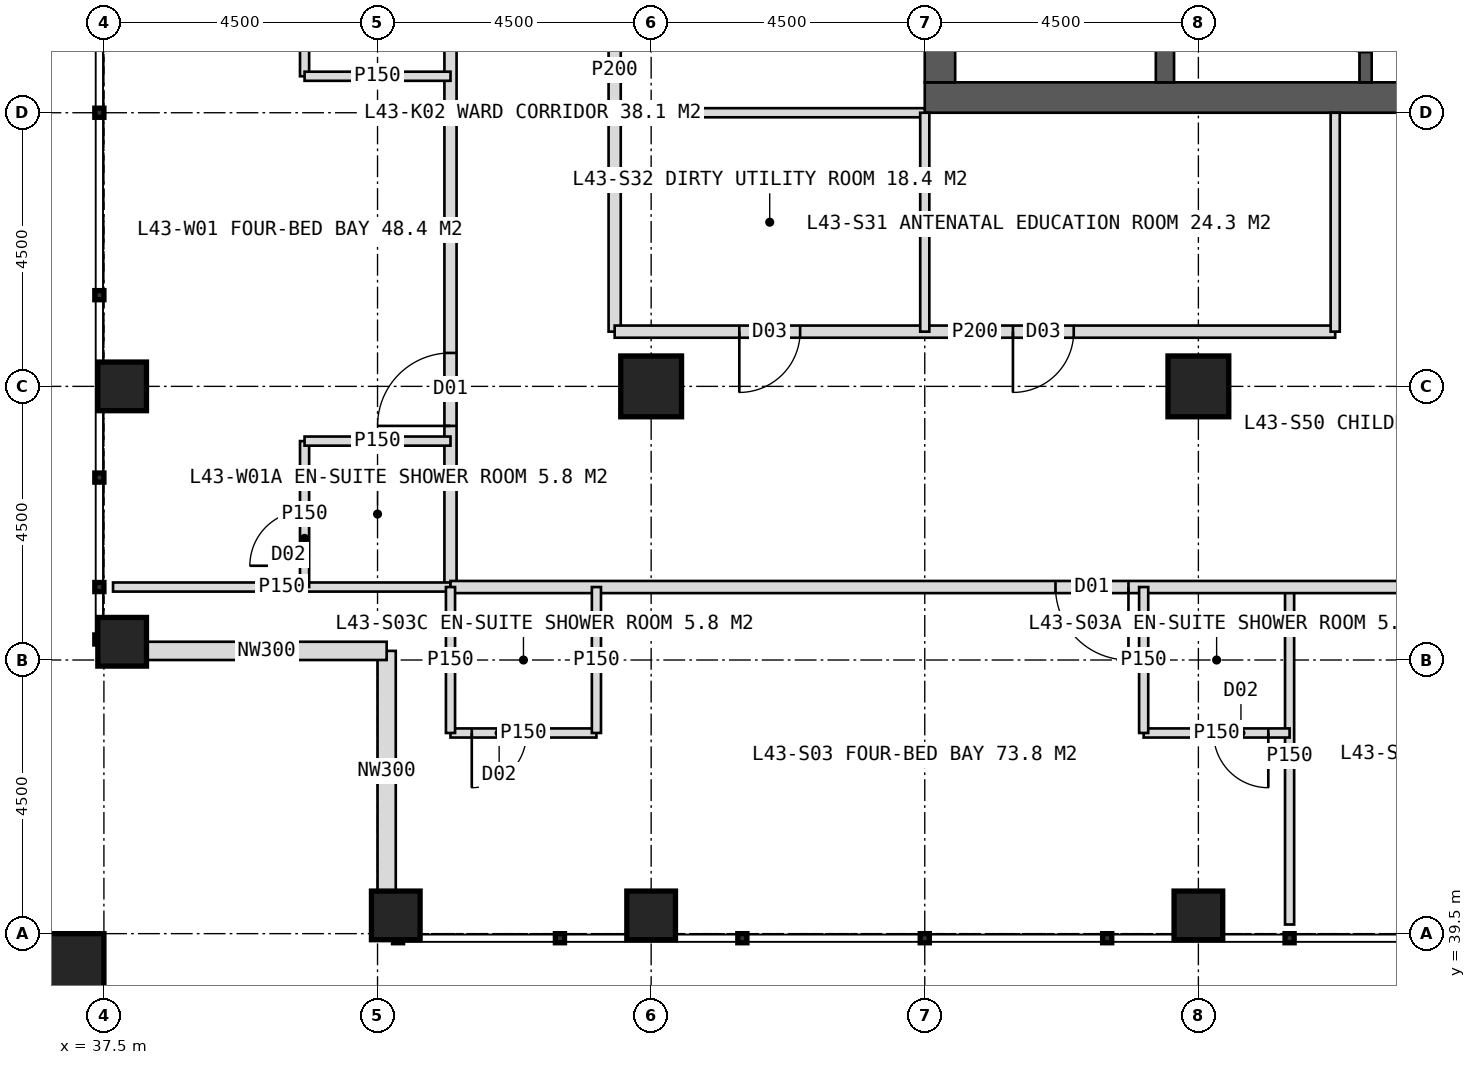
"""IFC4 building model, lengths in metres.
Left out: names, types, materials, properties, quantities, classifications, styles, units other than length and angle.
Written with IfcOpenShell. Run it as: python <this file> out.ifc"""

import sys

from ifc_helpers import new_model, si_unit, direction, frame, frame_2d, origin, origin_2d, place, context, subcontext, project, spatial, rectangle, hollow_rectangle, extrude, element, fill, save


model = new_model("IFC4")
c1 = context("Model", 3, precision=1e-05, world=origin(), true_north=direction((0.0, 1.0)))
c2 = subcontext(c1, "Body", "Model", "MODEL_VIEW")
j1 = project(units=[si_unit("LENGTHUNIT", "METRE"), si_unit("PLANEANGLEUNIT", "RADIAN")], contexts=[c1])
p1 = place(None, origin())
s1 = spatial("IfcSite", under=j1, at=p1, CompositionType="ELEMENT")
p2 = place(p1, origin())
s2 = spatial("IfcBuilding", under=s1, at=p2, CompositionType="ELEMENT")
p3 = place(p2, frame((0.0, 0.0, 181.0)))
s3 = spatial("IfcBuildingStorey", under=s2, at=p3, CompositionType="ELEMENT", Elevation=181.0)
p4 = place(p3, frame((51.0, 53.25, 0.0), z_axis=(0.0, 0.0, 1.0), x_axis=(1.0, 0.0, 0.0)))
e1 = element("IfcWall", 1, at=p4, inside=s3, PredefinedType="SHEAR", context=c2, shape_type="SweptSolid", body=[
    extrude(rectangle(XDim=18.0, YDim=0.5, at=frame_2d((9.0, 0.0))), origin(), (0.0, 0.0, 1.0), 4.0),
])
p5 = place(p4, frame((8.1, 0.0, 0.0)))
e2 = element("IfcOpeningElement", 2, at=p5, cuts=e1, PredefinedType="OPENING", context=c2, shape_type="SweptSolid", body=[
    extrude(rectangle(XDim=1.8, YDim=2.2, at=frame_2d((0.9, 1.1))), frame((0.0, 0.26, 0.0), z_axis=(0.0, -1.0, 0.0), x_axis=(1.0, 0.0, 0.0)), (0.0, 0.0, 1.0), 0.52),
])
p6 = place(p3, frame((51.25, 53.5, 0.0), z_axis=(0.0, 0.0, 1.0), x_axis=(0.0, 1.0, 0.0)))
e3 = element("IfcWall", 3, at=p6, inside=s3, PredefinedType="SHEAR", context=c2, shape_type="SweptSolid", body=[
    extrude(rectangle(XDim=17.0, YDim=0.5, at=frame_2d((8.5, 0.0))), origin(), (0.0, 0.0, 1.0), 4.0),
])
p7 = place(p6, frame((6.1, 0.0, 0.0)))
e4 = element("IfcOpeningElement", 4, at=p7, cuts=e3, PredefinedType="OPENING", context=c2, shape_type="SweptSolid", body=[
    extrude(rectangle(XDim=1.5, YDim=2.2, at=frame_2d((0.75, 1.1))), frame((0.0, 0.26, 0.0), z_axis=(0.0, -1.0, 0.0), x_axis=(1.0, 0.0, 0.0)), (0.0, 0.0, 1.0), 0.52),
])
p8 = place(p3, frame((54.95, 53.5, 0.0), z_axis=(0.0, 0.0, 1.0), x_axis=(0.0, 1.0, 0.0)))
e5 = element("IfcWall", 5, at=p8, inside=s3, PredefinedType="SHEAR", context=c2, shape_type="SweptSolid", body=[
    extrude(rectangle(XDim=17.0, YDim=0.3, at=frame_2d((8.5, 0.0))), origin(), (0.0, 0.0, 1.0), 4.0),
])
p9 = place(p3, frame((58.25, 53.5, 0.0), z_axis=(0.0, 0.0, 1.0), x_axis=(0.0, 1.0, 0.0)))
e6 = element("IfcWall", 6, at=p9, inside=s3, PredefinedType="SHEAR", context=c2, shape_type="SweptSolid", body=[
    extrude(rectangle(XDim=17.0, YDim=0.2, at=frame_2d((8.5, 0.0))), origin(), (0.0, 0.0, 1.0), 4.0),
])
p10 = place(p9, frame((0.496, 0.0, 0.0)))
e7 = element("IfcOpeningElement", 7, at=p10, cuts=e6, PredefinedType="OPENING", context=c2, shape_type="SweptSolid", body=[
    extrude(rectangle(XDim=1.0, YDim=2.1, at=frame_2d((0.5, 1.05))), frame((0.0, 0.11, 0.0), z_axis=(0.0, -1.0, 0.0), x_axis=(1.0, 0.0, 0.0)), (0.0, 0.0, 1.0), 0.22),
])
p11 = place(p9, frame((2.646, 0.0, 0.0)))
e8 = element("IfcOpeningElement", 8, at=p11, cuts=e6, PredefinedType="OPENING", context=c2, shape_type="SweptSolid", body=[
    extrude(rectangle(XDim=1.0, YDim=2.1, at=frame_2d((0.5, 1.05))), frame((0.0, 0.11, 0.0), z_axis=(0.0, -1.0, 0.0), x_axis=(1.0, 0.0, 0.0)), (0.0, 0.0, 1.0), 0.22),
])
p12 = place(p9, frame((5.027, 0.0, 0.0)))
e9 = element("IfcOpeningElement", 9, at=p12, cuts=e6, PredefinedType="OPENING", context=c2, shape_type="SweptSolid", body=[
    extrude(rectangle(XDim=1.0, YDim=2.1, at=frame_2d((0.5, 1.05))), frame((0.0, 0.11, 0.0), z_axis=(0.0, -1.0, 0.0), x_axis=(1.0, 0.0, 0.0)), (0.0, 0.0, 1.0), 0.22),
])
p13 = place(p9, frame((7.126, 0.0, 0.0)))
e10 = element("IfcOpeningElement", 10, at=p13, cuts=e6, PredefinedType="OPENING", context=c2, shape_type="SweptSolid", body=[
    extrude(rectangle(XDim=1.0, YDim=2.1, at=frame_2d((0.5, 1.05))), frame((0.0, 0.11, 0.0), z_axis=(0.0, -1.0, 0.0), x_axis=(1.0, 0.0, 0.0)), (0.0, 0.0, 1.0), 0.22),
])
p14 = place(p9, frame((10.025, 0.0, 0.0)))
e11 = element("IfcOpeningElement", 11, at=p14, cuts=e6, PredefinedType="OPENING", context=c2, shape_type="SweptSolid", body=[
    extrude(rectangle(XDim=1.4, YDim=2.2, at=frame_2d((0.7, 1.1))), frame((0.0, 0.11, 0.0), z_axis=(0.0, -1.0, 0.0), x_axis=(1.0, 0.0, 0.0)), (0.0, 0.0, 1.0), 0.22),
])
p15 = place(p9, frame((14.325, 0.0, 0.0)))
e12 = element("IfcOpeningElement", 12, at=p15, cuts=e6, PredefinedType="OPENING", context=c2, shape_type="SweptSolid", body=[
    extrude(rectangle(XDim=1.4, YDim=2.2, at=frame_2d((0.7, 1.1))), frame((0.0, 0.11, 0.0), z_axis=(0.0, -1.0, 0.0), x_axis=(1.0, 0.0, 0.0)), (0.0, 0.0, 1.0), 0.22),
])
for number, where, z_axis, x_axis in (
    (13, (46.5, 48.5, 0.0), (0.0, 0.0, 1.0), (1.0, 0.0, 0.0)),
    (14, (55.5, 48.5, 0.0), (0.0, 0.0, 1.0), (1.0, 0.0, 0.0)),
):
    element("IfcColumn", number, at=place(p3, frame(where, z_axis=z_axis, x_axis=x_axis)), inside=s3, PredefinedType="COLUMN", context=c2, shape_type="SweptSolid", body=[
        extrude(hollow_rectangle(XDim=1.0, YDim=1.0, WallThickness=0.1, at=origin_2d()), origin(), (0.0, 0.0, 1.0), 4.0),
    ])
for number, where, z_axis, x_axis in (
    (15, (42.3, 39.8, 0.0), (0.0, 0.0, 1.0), (1.0, 0.0, 0.0)),
    (16, (37.8, 44.3, 0.0), (0.0, 0.0, 1.0), (1.0, 0.0, 0.0)),
    (17, (46.5, 39.8, 0.0), (0.0, 0.0, 1.0), (1.0, 0.0, 0.0)),
    (18, (37.8, 48.5, 0.0), (0.0, 0.0, 1.0), (1.0, 0.0, 0.0)),
    (19, (55.5, 39.8, 0.0), (0.0, 0.0, 1.0), (1.0, 0.0, 0.0)),
):
    element("IfcColumn", number, at=place(p3, frame(where, z_axis=z_axis, x_axis=x_axis)), inside=s3, PredefinedType="COLUMN", context=c2, shape_type="SweptSolid", body=[
        extrude(hollow_rectangle(XDim=0.8, YDim=0.8, WallThickness=0.08, at=origin_2d()), origin(), (0.0, 0.0, 1.0), 4.0),
    ])
p16 = place(p3, frame((36.9, 38.9, 0.0), z_axis=(0.0, 0.0, 1.0), x_axis=(1.0, 0.0, 0.0)))
e20 = element("IfcColumn", 20, at=p16, inside=s3, PredefinedType="COLUMN", context=c2, shape_type="SweptSolid", body=[
    extrude(hollow_rectangle(XDim=1.2, YDim=1.2, WallThickness=0.07, at=origin_2d()), origin(), (0.0, 0.0, 1.0), 4.0),
])
for number, where, z_axis, x_axis in (
    (21, (42.15, 40.2, 0.0), (0.0, 0.0, 1.0), (0.0, 1.0, 0.0)),
    (22, (42.15, 44.15, 0.0), (0.0, 0.0, 1.0), (-1.0, 0.0, 0.0)),
):
    element("IfcWall", number, at=place(p3, frame(where, z_axis=z_axis, x_axis=x_axis)), inside=s3, PredefinedType="ELEMENTEDWALL", context=c2, shape_type="SweptSolid", body=[
        extrude(rectangle(XDim=3.95, YDim=0.3, at=frame_2d((1.975, 0.0))), origin(), (0.0, 0.0, 1.0), 2.85),
    ])
p17 = place(p3, frame((43.2, 45.2, 0.0), z_axis=(0.0, 0.0, 1.0), x_axis=(0.0, 1.0, 0.0)))
e23 = element("IfcWall", 23, at=p17, inside=s3, PredefinedType="PARTITIONING", context=c2, shape_type="SweptSolid", body=[
    extrude(rectangle(XDim=33.6, YDim=0.2, at=frame_2d((16.8, 0.0))), origin(), (0.0, 0.0, 1.0), 3.75),
])
p18 = place(p17, frame((2.65, 0.0, 0.0)))
e24 = element("IfcOpeningElement", 24, at=p18, cuts=e23, PredefinedType="OPENING", context=c2, shape_type="SweptSolid", body=[
    extrude(rectangle(XDim=1.2, YDim=2.2, at=frame_2d((0.6, 1.1))), frame((0.0, 0.11, 0.0), z_axis=(0.0, -1.0, 0.0), x_axis=(1.0, 0.0, 0.0)), (0.0, 0.0, 1.0), 0.22),
])
p19 = place(p17, frame((13.45, 0.0, 0.0)))
e25 = element("IfcOpeningElement", 25, at=p19, cuts=e23, PredefinedType="OPENING", context=c2, shape_type="SweptSolid", body=[
    extrude(rectangle(XDim=1.2, YDim=2.2, at=frame_2d((0.6, 1.1))), frame((0.0, 0.11, 0.0), z_axis=(0.0, -1.0, 0.0), x_axis=(1.0, 0.0, 0.0)), (0.0, 0.0, 1.0), 0.22),
])
p20 = place(p17, frame((20.05, 0.0, 0.0)))
e26 = element("IfcOpeningElement", 26, at=p20, cuts=e23, PredefinedType="OPENING", context=c2, shape_type="SweptSolid", body=[
    extrude(rectangle(XDim=1.2, YDim=2.2, at=frame_2d((0.6, 1.1))), frame((0.0, 0.11, 0.0), z_axis=(0.0, -1.0, 0.0), x_axis=(1.0, 0.0, 0.0)), (0.0, 0.0, 1.0), 0.22),
])
p21 = place(p17, frame((29.05, 0.0, 0.0)))
e27 = element("IfcOpeningElement", 27, at=p21, cuts=e23, PredefinedType="OPENING", context=c2, shape_type="SweptSolid", body=[
    extrude(rectangle(XDim=1.2, YDim=2.2, at=frame_2d((0.6, 1.1))), frame((0.0, 0.11, 0.0), z_axis=(0.0, -1.0, 0.0), x_axis=(1.0, 0.0, 0.0)), (0.0, 0.0, 1.0), 0.22),
])
p22 = place(p3, frame((43.2, 45.2, 0.0), z_axis=(0.0, 0.0, 1.0), x_axis=(-1.0, 0.0, 0.0)))
e28 = element("IfcWall", 28, at=p22, inside=s3, PredefinedType="PARTITIONING", context=c2, shape_type="SweptSolid", body=[
    extrude(rectangle(XDim=5.55, YDim=0.15, at=frame_2d((2.775, 0.0))), origin(), (0.0, 0.0, 1.0), 3.75),
])
p23 = place(p3, frame((40.8, 45.2, 0.0), z_axis=(0.0, 0.0, 1.0), x_axis=(0.0, 1.0, 0.0)))
e29 = element("IfcWall", 29, at=p23, inside=s3, PredefinedType="PARTITIONING", context=c2, shape_type="SweptSolid", body=[
    extrude(rectangle(XDim=2.4, YDim=0.15, at=frame_2d((1.2, 0.0))), origin(), (0.0, 0.0, 1.0), 3.75),
])
p24 = place(p23, frame((0.35, 0.0, 0.0)))
e30 = element("IfcOpeningElement", 30, at=p24, cuts=e29, PredefinedType="OPENING", context=c2, shape_type="SweptSolid", body=[
    extrude(rectangle(XDim=0.9, YDim=2.1, at=frame_2d((0.45, 1.05))), frame((0.0, 0.085, 0.0), z_axis=(0.0, -1.0, 0.0), x_axis=(1.0, 0.0, 0.0)), (0.0, 0.0, 1.0), 0.17),
])
p25 = place(p3, frame((43.2, 47.6, 0.0), z_axis=(0.0, 0.0, 1.0), x_axis=(-1.0, 0.0, 0.0)))
e31 = element("IfcWall", 31, at=p25, inside=s3, PredefinedType="PARTITIONING", context=c2, shape_type="SweptSolid", body=[
    extrude(rectangle(XDim=2.4, YDim=0.15, at=frame_2d((1.2, 0.0))), origin(), (0.0, 0.0, 1.0), 3.75),
])
p26 = place(p3, frame((40.8, 53.6, 0.0), z_axis=(0.0, 0.0, 1.0), x_axis=(0.0, 1.0, 0.0)))
e32 = element("IfcWall", 32, at=p26, inside=s3, PredefinedType="PARTITIONING", context=c2, shape_type="SweptSolid", body=[
    extrude(rectangle(XDim=2.4, YDim=0.15, at=frame_2d((1.2, 0.0))), origin(), (0.0, 0.0, 1.0), 3.75),
])
p27 = place(p26, frame((1.15, 0.0, 0.0)))
e33 = element("IfcOpeningElement", 33, at=p27, cuts=e32, PredefinedType="OPENING", context=c2, shape_type="SweptSolid", body=[
    extrude(rectangle(XDim=0.9, YDim=2.1, at=frame_2d((0.45, 1.05))), frame((0.0, 0.085, 0.0), z_axis=(0.0, -1.0, 0.0), x_axis=(1.0, 0.0, 0.0)), (0.0, 0.0, 1.0), 0.17),
])
p28 = place(p3, frame((43.2, 53.6, 0.0), z_axis=(0.0, 0.0, 1.0), x_axis=(-1.0, 0.0, 0.0)))
e34 = element("IfcWall", 34, at=p28, inside=s3, PredefinedType="PARTITIONING", context=c2, shape_type="SweptSolid", body=[
    extrude(rectangle(XDim=2.4, YDim=0.15, at=frame_2d((1.2, 0.0))), origin(), (0.0, 0.0, 1.0), 3.75),
])
p29 = place(p3, frame((51.0, 53.0, 0.0), z_axis=(0.0, 0.0, 1.0), x_axis=(-1.0, 0.0, 0.0)))
e35 = element("IfcWall", 35, at=p29, inside=s3, PredefinedType="PARTITIONING", context=c2, shape_type="SweptSolid", body=[
    extrude(rectangle(XDim=5.1, YDim=0.15, at=frame_2d((2.55, 0.0))), origin(), (0.0, 0.0, 1.0), 3.75),
])
p30 = place(p3, frame((45.9, 49.4, 0.0), z_axis=(0.0, 0.0, 1.0), x_axis=(0.0, 1.0, 0.0)))
e36 = element("IfcWall", 36, at=p30, inside=s3, PredefinedType="PARTITIONING", context=c2, shape_type="SweptSolid", body=[
    extrude(rectangle(XDim=8.6, YDim=0.2, at=frame_2d((4.3, 0.0))), origin(), (0.0, 0.0, 1.0), 3.75),
])
p31 = place(p30, frame((5.6, 0.0, 0.0)))
e37 = element("IfcOpeningElement", 37, at=p31, cuts=e36, PredefinedType="OPENING", context=c2, shape_type="SweptSolid", body=[
    extrude(rectangle(XDim=1.0, YDim=2.1, at=frame_2d((0.5, 1.05))), frame((0.0, 0.11, 0.0), z_axis=(0.0, -1.0, 0.0), x_axis=(1.0, 0.0, 0.0)), (0.0, 0.0, 1.0), 0.22),
])
p32 = place(p3, frame((57.0, 45.2, 0.0), z_axis=(0.0, 0.0, 1.0), x_axis=(0.0, -1.0, 0.0)))
e38 = element("IfcWall", 38, at=p32, inside=s3, PredefinedType="PARTITIONING", context=c2, shape_type="SweptSolid", body=[
    extrude(rectangle(XDim=5.55, YDim=0.15, at=frame_2d((2.775, 0.0))), origin(), (0.0, 0.0, 1.0), 3.75),
])
p33 = place(p3, frame((76.8, 45.2, 0.0), z_axis=(0.0, 0.0, 1.0), x_axis=(-1.0, 0.0, 0.0)))
e39 = element("IfcWall", 39, at=p33, inside=s3, PredefinedType="PARTITIONING", context=c2, shape_type="SweptSolid", body=[
    extrude(rectangle(XDim=33.6, YDim=0.2, at=frame_2d((16.8, 0.0))), origin(), (0.0, 0.0, 1.0), 3.75),
])
p34 = place(p33, frame((2.65, 0.0, 0.0)))
e40 = element("IfcOpeningElement", 40, at=p34, cuts=e39, PredefinedType="OPENING", context=c2, shape_type="SweptSolid", body=[
    extrude(rectangle(XDim=1.2, YDim=2.2, at=frame_2d((0.6, 1.1))), frame((0.0, 0.11, 0.0), z_axis=(0.0, -1.0, 0.0), x_axis=(1.0, 0.0, 0.0)), (0.0, 0.0, 1.0), 0.22),
])
p35 = place(p33, frame((14.05, 0.0, 0.0)))
e41 = element("IfcOpeningElement", 41, at=p35, cuts=e39, PredefinedType="OPENING", context=c2, shape_type="SweptSolid", body=[
    extrude(rectangle(XDim=1.2, YDim=2.2, at=frame_2d((0.6, 1.1))), frame((0.0, 0.11, 0.0), z_axis=(0.0, -1.0, 0.0), x_axis=(1.0, 0.0, 0.0)), (0.0, 0.0, 1.0), 0.22),
])
p36 = place(p33, frame((22.45, 0.0, 0.0)))
e42 = element("IfcOpeningElement", 42, at=p36, cuts=e39, PredefinedType="OPENING", context=c2, shape_type="SweptSolid", body=[
    extrude(rectangle(XDim=1.2, YDim=2.2, at=frame_2d((0.6, 1.1))), frame((0.0, 0.11, 0.0), z_axis=(0.0, -1.0, 0.0), x_axis=(1.0, 0.0, 0.0)), (0.0, 0.0, 1.0), 0.22),
])
p37 = place(p3, frame((57.0, 42.8, 0.0), z_axis=(0.0, 0.0, 1.0), x_axis=(-1.0, 0.0, 0.0)))
e43 = element("IfcWall", 43, at=p37, inside=s3, PredefinedType="PARTITIONING", context=c2, shape_type="SweptSolid", body=[
    extrude(rectangle(XDim=2.4, YDim=0.15, at=frame_2d((1.2, 0.0))), origin(), (0.0, 0.0, 1.0), 3.75),
])
p38 = place(p37, frame((0.35, 0.0, 0.0)))
e44 = element("IfcOpeningElement", 44, at=p38, cuts=e43, PredefinedType="OPENING", context=c2, shape_type="SweptSolid", body=[
    extrude(rectangle(XDim=0.9, YDim=2.1, at=frame_2d((0.45, 1.05))), frame((0.0, 0.085, 0.0), z_axis=(0.0, -1.0, 0.0), x_axis=(1.0, 0.0, 0.0)), (0.0, 0.0, 1.0), 0.17),
])
p39 = place(p3, frame((54.6, 45.2, 0.0), z_axis=(0.0, 0.0, 1.0), x_axis=(0.0, -1.0, 0.0)))
e45 = element("IfcWall", 45, at=p39, inside=s3, PredefinedType="PARTITIONING", context=c2, shape_type="SweptSolid", body=[
    extrude(rectangle(XDim=2.4, YDim=0.15, at=frame_2d((1.2, 0.0))), origin(), (0.0, 0.0, 1.0), 3.75),
])
p40 = place(p3, frame((45.6, 42.8, 0.0), z_axis=(0.0, 0.0, 1.0), x_axis=(-1.0, 0.0, 0.0)))
e46 = element("IfcWall", 46, at=p40, inside=s3, PredefinedType="PARTITIONING", context=c2, shape_type="SweptSolid", body=[
    extrude(rectangle(XDim=2.4, YDim=0.15, at=frame_2d((1.2, 0.0))), origin(), (0.0, 0.0, 1.0), 3.75),
])
p41 = place(p40, frame((1.15, 0.0, 0.0)))
e47 = element("IfcOpeningElement", 47, at=p41, cuts=e46, PredefinedType="OPENING", context=c2, shape_type="SweptSolid", body=[
    extrude(rectangle(XDim=0.9, YDim=2.1, at=frame_2d((0.45, 1.05))), frame((0.0, 0.085, 0.0), z_axis=(0.0, -1.0, 0.0), x_axis=(1.0, 0.0, 0.0)), (0.0, 0.0, 1.0), 0.17),
])
for number, where, z_axis, x_axis in (
    (48, (45.6, 45.2, 0.0), (0.0, 0.0, 1.0), (0.0, -1.0, 0.0)),
    (49, (43.2, 45.2, 0.0), (0.0, 0.0, 1.0), (0.0, -1.0, 0.0)),
):
    element("IfcWall", number, at=place(p3, frame(where, z_axis=z_axis, x_axis=x_axis)), inside=s3, PredefinedType="PARTITIONING", context=c2, shape_type="SweptSolid", body=[
        extrude(rectangle(XDim=2.4, YDim=0.15, at=frame_2d((1.2, 0.0))), origin(), (0.0, 0.0, 1.0), 3.75),
    ])
p42 = place(p3, frame((57.75, 49.4, 0.0), z_axis=(0.0, 0.0, 1.0), x_axis=(-1.0, 0.0, 0.0)))
e50 = element("IfcWall", 50, at=p42, inside=s3, PredefinedType="PARTITIONING", context=c2, shape_type="SweptSolid", body=[
    extrude(rectangle(XDim=11.85, YDim=0.2, at=frame_2d((5.925, 0.0))), origin(), (0.0, 0.0, 1.0), 3.75),
])
p43 = place(p42, frame((4.3, 0.0, 0.0)))
e51 = element("IfcOpeningElement", 51, at=p43, cuts=e50, PredefinedType="OPENING", context=c2, shape_type="SweptSolid", body=[
    extrude(rectangle(XDim=1.0, YDim=2.1, at=frame_2d((0.5, 1.05))), frame((0.0, 0.11, 0.0), z_axis=(0.0, -1.0, 0.0), x_axis=(1.0, 0.0, 0.0)), (0.0, 0.0, 1.0), 0.22),
])
p44 = place(p42, frame((8.8, 0.0, 0.0)))
e52 = element("IfcOpeningElement", 52, at=p44, cuts=e50, PredefinedType="OPENING", context=c2, shape_type="SweptSolid", body=[
    extrude(rectangle(XDim=1.0, YDim=2.1, at=frame_2d((0.5, 1.05))), frame((0.0, 0.11, 0.0), z_axis=(0.0, -1.0, 0.0), x_axis=(1.0, 0.0, 0.0)), (0.0, 0.0, 1.0), 0.22),
])
for number, where, z_axis, x_axis in (
    (53, (57.75, 53.0, 0.0), (0.0, 0.0, 1.0), (0.0, -1.0, 0.0)),
    (54, (51.0, 53.0, 0.0), (0.0, 0.0, 1.0), (0.0, -1.0, 0.0)),
):
    element("IfcWall", number, at=place(p3, frame(where, z_axis=z_axis, x_axis=x_axis)), inside=s3, PredefinedType="PARTITIONING", context=c2, shape_type="SweptSolid", body=[
        extrude(rectangle(XDim=3.6, YDim=0.15, at=frame_2d((1.8, 0.0))), origin(), (0.0, 0.0, 1.0), 3.75),
    ])
p45 = place(p18, origin())
e55 = element("IfcDoor", 55, at=p45, inside=s3, OperationType="SINGLE_SWING_LEFT", PredefinedType="DOOR", context=c2, shape_type="SweptSolid", body=[
    extrude(rectangle(XDim=1.2, YDim=2.2, at=frame_2d((0.6, 1.1))), frame((0.0, 0.025, 0.0), z_axis=(0.0, -1.0, 0.0), x_axis=(1.0, 0.0, 0.0)), (0.0, 0.0, 1.0), 0.05),
])
fill(e24, e55)
p46 = place(p24, origin())
e56 = element("IfcDoor", 56, at=p46, inside=s3, OperationType="SINGLE_SWING_LEFT", PredefinedType="DOOR", context=c2, shape_type="SweptSolid", body=[
    extrude(rectangle(XDim=0.9, YDim=2.1, at=frame_2d((0.45, 1.05))), frame((0.0, 0.025, 0.0), z_axis=(0.0, -1.0, 0.0), x_axis=(1.0, 0.0, 0.0)), (0.0, 0.0, 1.0), 0.05),
])
fill(e30, e56)
p47 = place(p36, origin())
e57 = element("IfcDoor", 57, at=p47, inside=s3, OperationType="SINGLE_SWING_LEFT", PredefinedType="DOOR", context=c2, shape_type="SweptSolid", body=[
    extrude(rectangle(XDim=1.2, YDim=2.2, at=frame_2d((0.6, 1.1))), frame((0.0, 0.025, 0.0), z_axis=(0.0, -1.0, 0.0), x_axis=(1.0, 0.0, 0.0)), (0.0, 0.0, 1.0), 0.05),
])
fill(e42, e57)
p48 = place(p38, origin())
e58 = element("IfcDoor", 58, at=p48, inside=s3, OperationType="SINGLE_SWING_LEFT", PredefinedType="DOOR", context=c2, shape_type="SweptSolid", body=[
    extrude(rectangle(XDim=0.9, YDim=2.1, at=frame_2d((0.45, 1.05))), frame((0.0, 0.025, 0.0), z_axis=(0.0, -1.0, 0.0), x_axis=(1.0, 0.0, 0.0)), (0.0, 0.0, 1.0), 0.05),
])
fill(e44, e58)
p49 = place(p41, origin())
e59 = element("IfcDoor", 59, at=p49, inside=s3, OperationType="SINGLE_SWING_RIGHT", PredefinedType="DOOR", context=c2, shape_type="SweptSolid", body=[
    extrude(rectangle(XDim=0.9, YDim=2.1, at=frame_2d((0.45, 1.05))), frame((0.0, 0.025, 0.0), z_axis=(0.0, -1.0, 0.0), x_axis=(1.0, 0.0, 0.0)), (0.0, 0.0, 1.0), 0.05),
])
fill(e47, e59)
p50 = place(p43, origin())
e60 = element("IfcDoor", 60, at=p50, inside=s3, OperationType="SINGLE_SWING_RIGHT", PredefinedType="DOOR", context=c2, shape_type="SweptSolid", body=[
    extrude(rectangle(XDim=1.0, YDim=2.1, at=frame_2d((0.5, 1.05))), frame((0.0, 0.025, 0.0), z_axis=(0.0, -1.0, 0.0), x_axis=(1.0, 0.0, 0.0)), (0.0, 0.0, 1.0), 0.05),
])
fill(e51, e60)
p51 = place(p44, origin())
e61 = element("IfcDoor", 61, at=p51, inside=s3, OperationType="SINGLE_SWING_RIGHT", PredefinedType="DOOR", context=c2, shape_type="SweptSolid", body=[
    extrude(rectangle(XDim=1.0, YDim=2.1, at=frame_2d((0.5, 1.05))), frame((0.0, 0.025, 0.0), z_axis=(0.0, -1.0, 0.0), x_axis=(1.0, 0.0, 0.0)), (0.0, 0.0, 1.0), 0.05),
])
fill(e52, e61)
p52 = place(p10, origin())
e62 = element("IfcDoor", 62, at=p52, inside=s3, OperationType="SINGLE_SWING_RIGHT", PredefinedType="DOOR", context=c2, shape_type="SweptSolid", body=[
    extrude(rectangle(XDim=1.0, YDim=2.1, at=frame_2d((0.5, 1.05))), frame((0.0, 0.025, 0.0), z_axis=(0.0, -1.0, 0.0), x_axis=(1.0, 0.0, 0.0)), (0.0, 0.0, 1.0), 0.05),
])
fill(e7, e62)
save(model, sys.argv[1])
